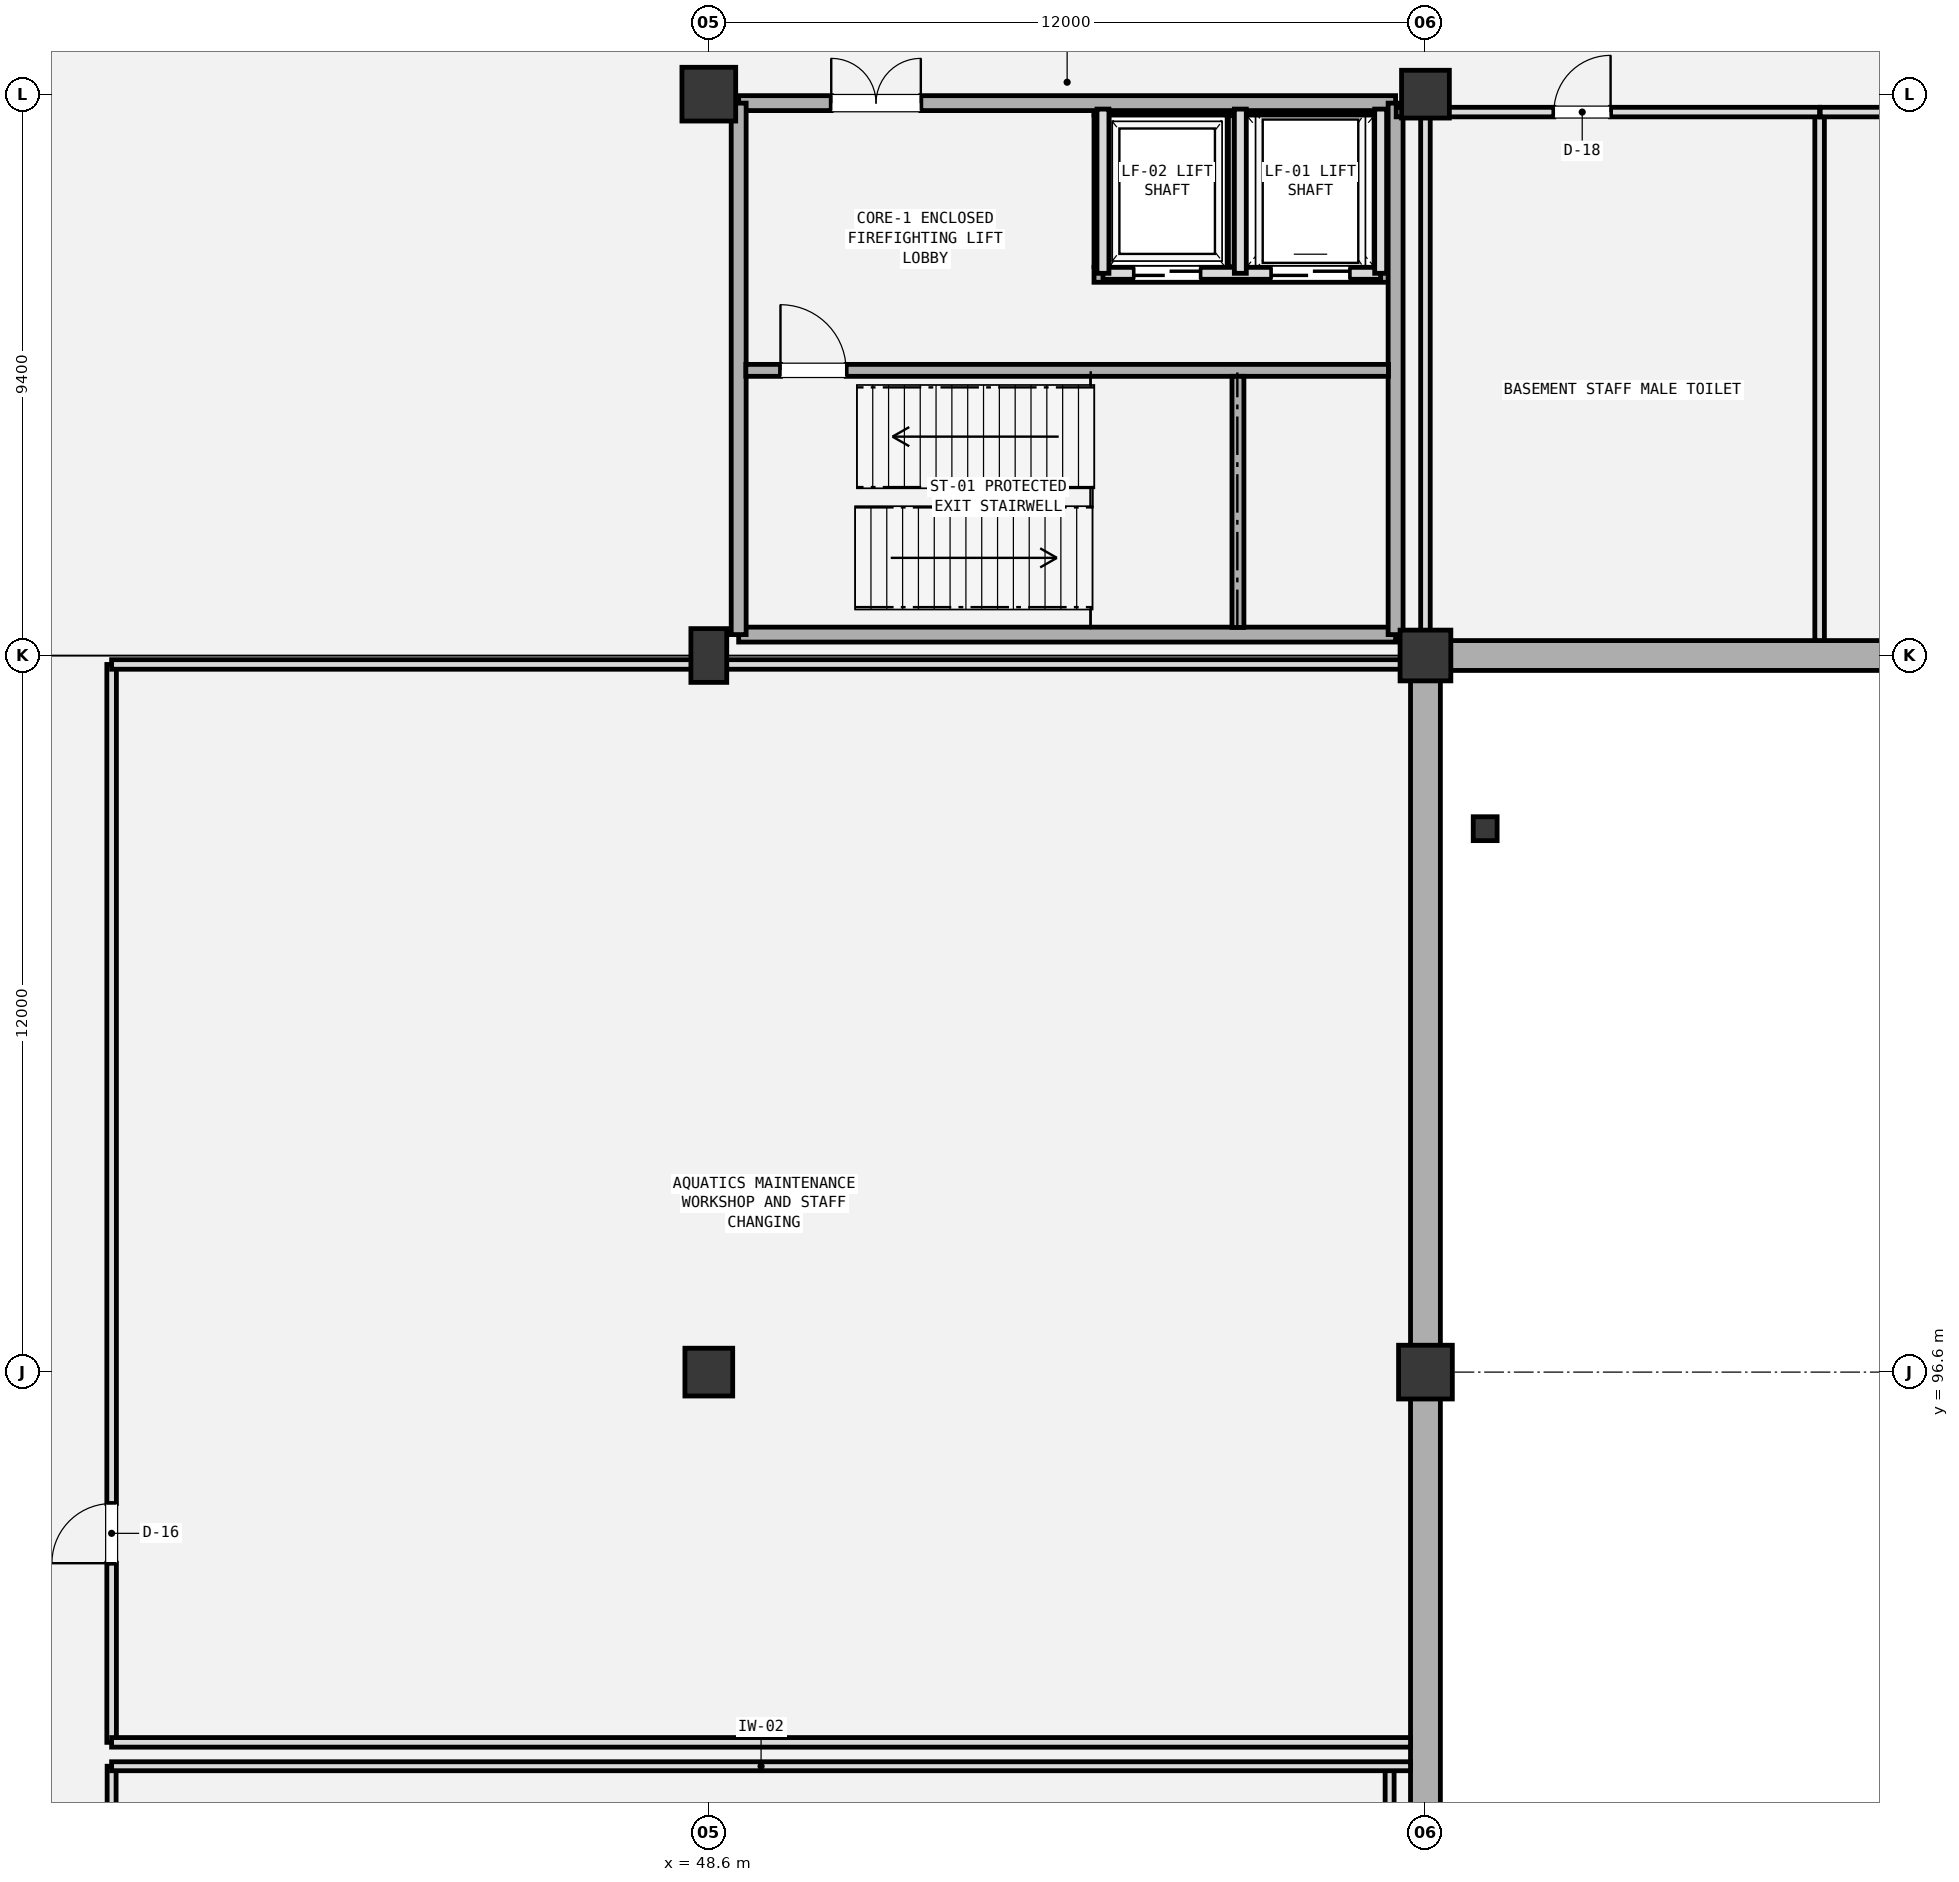
"""IFC4 building model, lengths in metres.
Left out: names, types, materials, properties, quantities, classifications, styles, units other than length and angle.
Written with IfcOpenShell. Run it as: python <this file> out.ifc"""

import sys

from ifc_helpers import new_model, si_unit, direction, frame, frame_2d, origin, origin_2d, place, context, subcontext, project, spatial, rectangle, extrude, element, fill, save


model = new_model("IFC4")
c1 = context("Model", 3, precision=1e-05, world=origin(), true_north=direction((0.0, 1.0)))
c2 = subcontext(c1, "Body", "Model", "MODEL_VIEW")
j1 = project(units=[si_unit("LENGTHUNIT", "METRE"), si_unit("PLANEANGLEUNIT", "RADIAN")], contexts=[c1])
p1 = place(None, origin())
s1 = spatial("IfcSite", under=j1, at=p1, CompositionType="ELEMENT")
p2 = place(p1, origin())
s2 = spatial("IfcBuilding", under=s1, at=p2, CompositionType="ELEMENT")
p3 = place(p2, frame((0.0, 0.0, -5.4)))
s3 = spatial("IfcBuildingStorey", under=s2, at=p3, CompositionType="ELEMENT", Elevation=-5.4)
for number, where, z_axis, x_axis in (
    (1, (55.05, 114.975, -1.6), (0.0, 0.0, 1.0), (1.0, 0.0, 0.0)),
    (2, (55.05, 117.775, -1.6), (0.0, 0.0, 1.0), (1.0, 0.0, 0.0)),
):
    element("IfcWall", number, at=place(p3, frame(where, z_axis=z_axis, x_axis=x_axis)), inside=s3, PredefinedType="SHEAR", context=c2, shape_type="SweptSolid", body=[
        extrude(rectangle(XDim=4.93, YDim=0.25, at=frame_2d((2.465, 0.0))), origin(), (0.0, 0.0, 1.0), 1.05),
    ])
for number, where, z_axis, x_axis in (
    (3, (55.175, 115.11, -1.6), (0.0, 0.0, 1.0), (0.0, 1.0, 0.0)),
    (4, (59.865, 115.11, -1.6), (0.0, 0.0, 1.0), (0.0, 1.0, 0.0)),
    (5, (57.425, 115.11, -1.6), (0.0, 0.0, 1.0), (0.0, 1.0, 0.0)),
):
    element("IfcWall", number, at=place(p3, frame(where, z_axis=z_axis, x_axis=x_axis)), inside=s3, PredefinedType="SHEAR", context=c2, shape_type="SweptSolid", body=[
        extrude(rectangle(XDim=2.53, YDim=0.25, at=frame_2d((1.265, 0.0))), origin(), (0.0, 0.0, 1.0), 1.05),
    ])
p4 = place(p3, frame((60.6, 108.6, 0.0), z_axis=(0.0, 0.0, 1.0), x_axis=(1.0, 0.0, 0.0)))
e6 = element("IfcWall", 6, at=p4, inside=s3, PredefinedType="USERDEFINED", context=c2, shape_type="SweptSolid", body=[
    extrude(rectangle(XDim=24.2, YDim=0.5, at=frame_2d((12.1, 0.0))), origin(), (0.0, 0.0, 1.0), 4.98),
])
p5 = place(p3, frame((60.6, 72.25, 0.0), z_axis=(0.0, 0.0, 1.0), x_axis=(0.0, 1.0, 0.0)))
e7 = element("IfcWall", 7, at=p5, inside=s3, PredefinedType="USERDEFINED", context=c2, shape_type="SweptSolid", body=[
    extrude(rectangle(XDim=36.35, YDim=0.5, at=frame_2d((18.175, 0.0))), origin(), (0.0, 0.0, 1.0), 4.98),
])
p6 = place(p3, frame((61.6, 105.7, -0.55), z_axis=(0.0, 0.0, 1.0), x_axis=(1.0, 0.0, 0.0)))
e8 = element("IfcColumn", 8, at=p6, inside=s3, PredefinedType="COLUMN", context=c2, shape_type="SweptSolid", body=[
    extrude(rectangle(XDim=0.4, YDim=0.4, at=origin_2d()), origin(), (0.0, 0.0, 1.0), 5.65),
])
p7 = place(p3, frame((48.6, 96.6, -0.55), z_axis=(0.0, 0.0, 1.0), x_axis=(1.0, 0.0, 0.0)))
e9 = element("IfcColumn", 9, at=p7, inside=s3, PredefinedType="COLUMN", context=c2, shape_type="SweptSolid", body=[
    extrude(rectangle(XDim=0.8, YDim=0.8, at=origin_2d()), origin(), (0.0, 0.0, 1.0), 5.95),
])
p8 = place(p3, frame((48.6, 108.6, -0.55), z_axis=(0.0, 0.0, 1.0), x_axis=(1.0, 0.0, 0.0)))
e10 = element("IfcColumn", 10, at=p8, inside=s3, PredefinedType="COLUMN", context=c2, shape_type="SweptSolid", body=[
    extrude(rectangle(XDim=0.6, YDim=0.9, at=origin_2d()), origin(), (0.0, 0.0, 1.0), 5.95),
])
for number, where, z_axis, x_axis in (
    (11, (48.6, 118.0, -0.55), (0.0, 0.0, 1.0), (1.0, 0.0, 0.0)),
    (12, (60.6, 96.6, -0.55), (0.0, 0.0, 1.0), (1.0, 0.0, 0.0)),
):
    element("IfcColumn", number, at=place(p3, frame(where, z_axis=z_axis, x_axis=x_axis)), inside=s3, PredefinedType="COLUMN", context=c2, shape_type="SweptSolid", body=[
        extrude(rectangle(XDim=0.9, YDim=0.9, at=origin_2d()), origin(), (0.0, 0.0, 1.0), 5.95),
    ])
p9 = place(p3, frame((60.6, 108.6, -0.55), z_axis=(0.0, 0.0, 1.0), x_axis=(1.0, 0.0, 0.0)))
e13 = element("IfcColumn", 13, at=p9, inside=s3, PredefinedType="COLUMN", context=c2, shape_type="SweptSolid", body=[
    extrude(rectangle(XDim=0.85, YDim=0.85, at=origin_2d()), origin(), (0.0, 0.0, 1.0), 5.95),
])
p10 = place(p3, frame((60.6, 118.0, -0.55), z_axis=(0.0, 0.0, 1.0), x_axis=(1.0, 0.0, 0.0)))
e14 = element("IfcColumn", 14, at=p10, inside=s3, PredefinedType="COLUMN", context=c2, shape_type="SweptSolid", body=[
    extrude(rectangle(XDim=0.8, YDim=0.8, at=origin_2d()), origin(), (0.0, 0.0, 1.0), 5.95),
])
p11 = place(p3, frame((49.1, 108.95, -0.15), z_axis=(0.0, 0.0, 1.0), x_axis=(1.0, 0.0, 0.0)))
e15 = element("IfcWall", 15, at=p11, inside=s3, PredefinedType="SHEAR", context=c2, shape_type="SweptSolid", body=[
    extrude(rectangle(XDim=11.0, YDim=0.25, at=frame_2d((5.5, 0.0))), origin(), (0.0, 0.0, 1.0), 5.13),
])
p12 = place(p3, frame((49.1, 117.85, -0.15), z_axis=(0.0, 0.0, 1.0), x_axis=(1.0, 0.0, 0.0)))
e16 = element("IfcWall", 16, at=p12, inside=s3, PredefinedType="SHEAR", context=c2, shape_type="SweptSolid", body=[
    extrude(rectangle(XDim=11.0, YDim=0.25, at=frame_2d((5.5, 0.0))), origin(), (0.0, 0.0, 1.0), 5.13),
])
p13 = place(p12, frame((1.55, 0.0, 0.15)))
e17 = element("IfcOpeningElement", 17, at=p13, cuts=e16, PredefinedType="OPENING", context=c2, shape_type="SweptSolid", body=[
    extrude(rectangle(XDim=1.5, YDim=2.2, at=frame_2d((0.75, 1.1))), frame((0.0, 0.135, 0.0), z_axis=(0.0, -1.0, 0.0), x_axis=(1.0, 0.0, 0.0)), (0.0, 0.0, 1.0), 0.27),
])
for number, where, z_axis, x_axis in (
    (18, (49.1, 108.95, -0.15), (0.0, 0.0, 1.0), (0.0, 1.0, 0.0)),
    (19, (60.1, 108.95, -0.15), (0.0, 0.0, 1.0), (0.0, 1.0, 0.0)),
):
    element("IfcWall", number, at=place(p3, frame(where, z_axis=z_axis, x_axis=x_axis)), inside=s3, PredefinedType="SHEAR", context=c2, shape_type="SweptSolid", body=[
        extrude(rectangle(XDim=8.9, YDim=0.25, at=frame_2d((4.45, 0.0))), origin(), (0.0, 0.0, 1.0), 5.13),
    ])
p14 = place(p3, frame((49.22, 113.375, -0.15), z_axis=(0.0, 0.0, 1.0), x_axis=(1.0, 0.0, 0.0)))
e20 = element("IfcWall", 20, at=p14, inside=s3, PredefinedType="SHEAR", context=c2, shape_type="SweptSolid", body=[
    extrude(rectangle(XDim=10.76, YDim=0.2, at=frame_2d((5.38, 0.0))), origin(), (0.0, 0.0, 1.0), 5.13),
])
p15 = place(p14, frame((0.58, 0.0, 0.15)))
e21 = element("IfcOpeningElement", 21, at=p15, cuts=e20, PredefinedType="OPENING", context=c2, shape_type="SweptSolid", body=[
    extrude(rectangle(XDim=1.1, YDim=2.2, at=frame_2d((0.55, 1.1))), frame((0.0, 0.11, 0.0), z_axis=(0.0, -1.0, 0.0), x_axis=(1.0, 0.0, 0.0)), (0.0, 0.0, 1.0), 0.22),
])
p16 = place(p3, frame((57.46, 109.07, -0.15), z_axis=(0.0, 0.0, 1.0), x_axis=(0.0, 1.0, 0.0)))
e22 = element("IfcWall", 22, at=p16, inside=s3, PredefinedType="SHEAR", context=c2, shape_type="SweptSolid", body=[
    extrude(rectangle(XDim=4.205, YDim=0.2, at=frame_2d((2.103, 0.0))), origin(), (0.0, 0.0, 1.0), 5.13),
])
p17 = place(p3, frame((55.2, 115.0, -0.15), z_axis=(0.0, 0.0, 1.0), x_axis=(1.0, 0.0, 0.0)))
e23 = element("IfcWall", 23, at=p17, inside=s3, PredefinedType="SOLIDWALL", context=c2, shape_type="SweptSolid", body=[
    extrude(rectangle(XDim=4.65, YDim=0.2, at=frame_2d((2.325, 0.0))), origin(), (0.0, 0.0, 1.0), 4.73),
])
p18 = place(p17, frame((2.825, 0.0, 0.15)))
e24 = element("IfcOpeningElement", 24, at=p18, cuts=e23, PredefinedType="OPENING", context=c2, shape_type="SweptSolid", body=[
    extrude(rectangle(XDim=1.3, YDim=2.3, at=frame_2d((0.65, 1.15))), frame((0.0, 0.11, 0.0), z_axis=(0.0, -1.0, 0.0), x_axis=(1.0, 0.0, 0.0)), (0.0, 0.0, 1.0), 0.22),
])
p19 = place(p17, frame((0.525, 0.0, 0.15)))
e25 = element("IfcOpeningElement", 25, at=p19, cuts=e23, PredefinedType="OPENING", context=c2, shape_type="SweptSolid", body=[
    extrude(rectangle(XDim=1.1, YDim=2.2, at=frame_2d((0.55, 1.1))), frame((0.0, 0.11, 0.0), z_axis=(0.0, -1.0, 0.0), x_axis=(1.0, 0.0, 0.0)), (0.0, 0.0, 1.0), 0.22),
])
for number, where, z_axis, x_axis in (
    (26, (57.5, 115.0, -0.15), (0.0, 0.0, 1.0), (0.0, 1.0, 0.0)),
    (27, (59.85, 115.0, -0.15), (0.0, 0.0, 1.0), (0.0, 1.0, 0.0)),
    (28, (55.2, 115.0, -0.15), (0.0, 0.0, 1.0), (0.0, 1.0, 0.0)),
):
    element("IfcWall", number, at=place(p3, frame(where, z_axis=z_axis, x_axis=x_axis)), inside=s3, PredefinedType="SOLIDWALL", context=c2, shape_type="SweptSolid", body=[
        extrude(rectangle(XDim=2.75, YDim=0.2, at=frame_2d((1.375, 0.0))), origin(), (0.0, 0.0, 1.0), 5.13),
    ])
p20 = place(p3, frame((38.6, 73.0, 0.0), z_axis=(0.0, 0.0, 1.0), x_axis=(0.0, 1.0, 0.0)))
e29 = element("IfcWall", 29, at=p20, inside=s3, PredefinedType="PARTITIONING", context=c2, shape_type="SweptSolid", body=[
    extrude(rectangle(XDim=17.0, YDim=0.15, at=frame_2d((8.5, 0.0))), origin(), (0.0, 0.0, 1.0), 3.8),
])
p21 = place(p20, frame((6.0, 0.0, 0.0)))
e30 = element("IfcOpeningElement", 30, at=p21, cuts=e29, PredefinedType="OPENING", context=c2, shape_type="SweptSolid", body=[
    extrude(rectangle(XDim=1.6, YDim=2.2, at=frame_2d((0.8, 1.1))), frame((0.0, 0.085, 0.0), z_axis=(0.0, -1.0, 0.0), x_axis=(1.0, 0.0, 0.0)), (0.0, 0.0, 1.0), 0.17),
])
p22 = place(p3, frame((60.0, 73.0, 0.0), z_axis=(0.0, 0.0, 1.0), x_axis=(0.0, 1.0, 0.0)))
e31 = element("IfcWall", 31, at=p22, inside=s3, PredefinedType="PARTITIONING", context=c2, shape_type="SweptSolid", body=[
    extrude(rectangle(XDim=17.0, YDim=0.15, at=frame_2d((8.5, 0.0))), origin(), (0.0, 0.0, 1.0), 3.8),
])
p23 = place(p3, frame((38.6, 90.0, 0.0), z_axis=(0.0, 0.0, 1.0), x_axis=(1.0, 0.0, 0.0)))
e32 = element("IfcWall", 32, at=p23, inside=s3, PredefinedType="PARTITIONING", context=c2, shape_type="SweptSolid", body=[
    extrude(rectangle(XDim=21.75, YDim=0.15, at=frame_2d((10.875, 0.0))), origin(), (0.0, 0.0, 1.0), 3.8),
])
p24 = place(p3, frame((38.6, 90.4, 0.0), z_axis=(0.0, 0.0, 1.0), x_axis=(0.0, 1.0, 0.0)))
e33 = element("IfcWall", 33, at=p24, inside=s3, PredefinedType="PLUMBINGWALL", context=c2, shape_type="SweptSolid", body=[
    extrude(rectangle(XDim=18.05, YDim=0.16, at=frame_2d((9.025, 0.0))), origin(), (0.0, 0.0, 1.0), 3.8),
])
p25 = place(p24, frame((3.0, 0.0, 0.0)))
e34 = element("IfcOpeningElement", 34, at=p25, cuts=e33, PredefinedType="OPENING", context=c2, shape_type="SweptSolid", body=[
    extrude(rectangle(XDim=1.0, YDim=2.2, at=frame_2d((0.5, 1.1))), frame((0.0, 0.09, 0.0), z_axis=(0.0, -1.0, 0.0), x_axis=(1.0, 0.0, 0.0)), (0.0, 0.0, 1.0), 0.18),
])
for number, where, z_axis, x_axis in (
    (35, (38.6, 90.4, 0.0), (0.0, 0.0, 1.0), (1.0, 0.0, 0.0)),
    (36, (38.6, 108.45, 0.0), (0.0, 0.0, 1.0), (1.0, 0.0, 0.0)),
):
    element("IfcWall", number, at=place(p3, frame(where, z_axis=z_axis, x_axis=x_axis)), inside=s3, PredefinedType="PLUMBINGWALL", context=c2, shape_type="SweptSolid", body=[
        extrude(rectangle(XDim=21.75, YDim=0.16, at=frame_2d((10.875, 0.0))), origin(), (0.0, 0.0, 1.0), 3.8),
    ])
for number, where, z_axis, x_axis in (
    (37, (60.6, 108.85, 0.0), (0.0, 0.0, 1.0), (0.0, 1.0, 0.0)),
    (38, (67.2, 108.85, 0.0), (0.0, 0.0, 1.0), (0.0, 1.0, 0.0)),
):
    element("IfcWall", number, at=place(p3, frame(where, z_axis=z_axis, x_axis=x_axis)), inside=s3, PredefinedType="PLUMBINGWALL", context=c2, shape_type="SweptSolid", body=[
        extrude(rectangle(XDim=8.85, YDim=0.16, at=frame_2d((4.425, 0.0))), origin(), (0.0, 0.0, 1.0), 3.8),
    ])
p26 = place(p3, frame((60.11, 117.7, 0.0), z_axis=(0.0, 0.0, 1.0), x_axis=(1.0, 0.0, 0.0)))
e39 = element("IfcWall", 39, at=p26, inside=s3, PredefinedType="PLUMBINGWALL", context=c2, shape_type="SweptSolid", body=[
    extrude(rectangle(XDim=7.09, YDim=0.16, at=frame_2d((3.545, 0.0))), origin(), (0.0, 0.0, 1.0), 3.8),
])
p27 = place(p26, frame((2.64, 0.0, 0.0)))
e40 = element("IfcOpeningElement", 40, at=p27, cuts=e39, PredefinedType="OPENING", context=c2, shape_type="SweptSolid", body=[
    extrude(rectangle(XDim=0.95, YDim=2.15, at=frame_2d((0.475, 1.075))), frame((0.0, 0.09, 0.0), z_axis=(0.0, -1.0, 0.0), x_axis=(1.0, 0.0, 0.0)), (0.0, 0.0, 1.0), 0.18),
])
p28 = place(p3, frame((67.21, 117.7, 0.0), z_axis=(0.0, 0.0, 1.0), x_axis=(1.0, 0.0, 0.0)))
e41 = element("IfcWall", 41, at=p28, inside=s3, PredefinedType="PLUMBINGWALL", context=c2, shape_type="SweptSolid", body=[
    extrude(rectangle(XDim=6.99, YDim=0.16, at=frame_2d((3.495, 0.0))), origin(), (0.0, 0.0, 1.0), 3.8),
])
p29 = place(p28, frame((2.79, 0.0, 0.0)))
e42 = element("IfcOpeningElement", 42, at=p29, cuts=e41, PredefinedType="OPENING", context=c2, shape_type="SweptSolid", body=[
    extrude(rectangle(XDim=0.95, YDim=2.15, at=frame_2d((0.475, 1.075))), frame((0.0, 0.09, 0.0), z_axis=(0.0, -1.0, 0.0), x_axis=(1.0, 0.0, 0.0)), (0.0, 0.0, 1.0), 0.18),
])
p30 = place(p13, origin())
e43 = element("IfcDoor", 43, at=p30, inside=s3, OperationType="DOUBLE_DOOR_SINGLE_SWING", PredefinedType="DOOR", context=c2, shape_type="SweptSolid", body=[
    extrude(rectangle(XDim=1.5, YDim=2.2, at=frame_2d((0.75, 1.1))), frame((0.0, 0.025, 0.0), z_axis=(0.0, -1.0, 0.0), x_axis=(1.0, 0.0, 0.0)), (0.0, 0.0, 1.0), 0.05),
])
fill(e17, e43)
p31 = place(p15, origin())
e44 = element("IfcDoor", 44, at=p31, inside=s3, OperationType="SINGLE_SWING_LEFT", PredefinedType="DOOR", context=c2, shape_type="SweptSolid", body=[
    extrude(rectangle(XDim=1.1, YDim=2.2, at=frame_2d((0.55, 1.1))), frame((0.0, 0.025, 0.0), z_axis=(0.0, -1.0, 0.0), x_axis=(1.0, 0.0, 0.0)), (0.0, 0.0, 1.0), 0.05),
])
fill(e21, e44)
p32 = place(p18, frame((1.3, 0.0, 0.0), z_axis=(0.0, 0.0, 1.0), x_axis=(-1.0, 0.0, 0.0)))
e45 = element("IfcDoor", 45, at=p32, inside=s3, OperationType="DOUBLE_DOOR_SLIDING", PredefinedType="DOOR", context=c2, shape_type="SweptSolid", body=[
    extrude(rectangle(XDim=1.3, YDim=2.3, at=frame_2d((0.65, 1.15))), frame((0.0, 0.025, 0.0), z_axis=(0.0, -1.0, 0.0), x_axis=(1.0, 0.0, 0.0)), (0.0, 0.0, 1.0), 0.05),
])
fill(e24, e45)
p33 = place(p19, frame((1.1, 0.0, 0.0), z_axis=(0.0, 0.0, 1.0), x_axis=(-1.0, 0.0, 0.0)))
e46 = element("IfcDoor", 46, at=p33, inside=s3, OperationType="DOUBLE_DOOR_SLIDING", PredefinedType="DOOR", context=c2, shape_type="SweptSolid", body=[
    extrude(rectangle(XDim=1.1, YDim=2.2, at=frame_2d((0.55, 1.1))), frame((0.0, 0.025, 0.0), z_axis=(0.0, -1.0, 0.0), x_axis=(1.0, 0.0, 0.0)), (0.0, 0.0, 1.0), 0.05),
])
fill(e25, e46)
p34 = place(p25, origin())
e47 = element("IfcDoor", 47, at=p34, inside=s3, OperationType="SINGLE_SWING_LEFT", PredefinedType="DOOR", context=c2, shape_type="SweptSolid", body=[
    extrude(rectangle(XDim=1.0, YDim=2.2, at=frame_2d((0.5, 1.1))), frame((0.0, 0.025, 0.0), z_axis=(0.0, -1.0, 0.0), x_axis=(1.0, 0.0, 0.0)), (0.0, 0.0, 1.0), 0.05),
])
fill(e34, e47)
p35 = place(p27, origin())
e48 = element("IfcDoor", 48, at=p35, inside=s3, OperationType="SINGLE_SWING_RIGHT", PredefinedType="DOOR", context=c2, shape_type="SweptSolid", body=[
    extrude(rectangle(XDim=0.95, YDim=2.15, at=frame_2d((0.475, 1.075))), frame((0.0, 0.025, 0.0), z_axis=(0.0, -1.0, 0.0), x_axis=(1.0, 0.0, 0.0)), (0.0, 0.0, 1.0), 0.05),
])
fill(e40, e48)
save(model, sys.argv[1])
